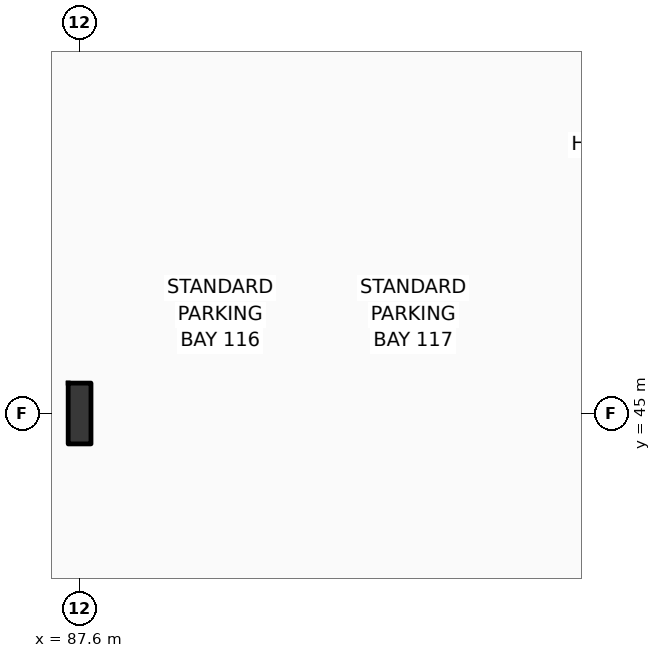
"""IFC4 building model, lengths in metres.
Left out: names, types, materials, properties, quantities, classifications, styles, units other than length and angle.
Written with IfcOpenShell. Run it as: python <this file> out.ifc"""

import sys

from ifc_helpers import new_model, si_unit, direction, frame, origin, origin_2d, place, context, subcontext, project, spatial, i_section, extrude, element, save


model = new_model("IFC4")
c1 = context("Model", 3, precision=1e-05, world=origin(), true_north=direction((0.0, 1.0)))
c2 = subcontext(c1, "Body", "Model", "MODEL_VIEW")
j1 = project(units=[si_unit("LENGTHUNIT", "METRE"), si_unit("PLANEANGLEUNIT", "RADIAN")], contexts=[c1])
p1 = place(None, origin())
s1 = spatial("IfcSite", under=j1, at=p1, CompositionType="ELEMENT")
p2 = place(p1, origin())
s2 = spatial("IfcBuilding", under=s1, at=p2, CompositionType="ELEMENT")
p3 = place(p2, frame((0.0, 0.0, -4.5)))
s3 = spatial("IfcBuildingStorey", under=s2, at=p3, CompositionType="ELEMENT", Elevation=-4.5)
p4 = place(p3, frame((87.6, 45.0, 0.0), z_axis=(0.0, 0.0, 1.0), x_axis=(1.0, 0.0, 0.0)))
e1 = element("IfcColumn", 1, at=p4, inside=s3, PredefinedType="COLUMN", context=c2, shape_type="SweptSolid", body=[
    extrude(i_section(OverallWidth=0.3, OverallDepth=0.8, WebThickness=0.018, FlangeThickness=0.033, FilletRadius=0.03, at=origin_2d()), origin(), (0.0, 0.0, 1.0), 4.5),
])
save(model, sys.argv[1])
